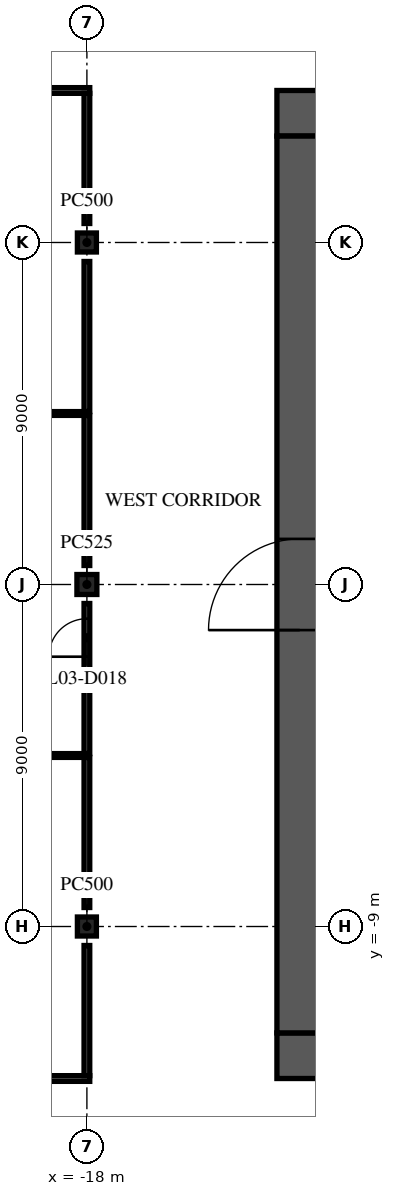
"""IFC4 building model, lengths in metres.
Left out: names, types, materials, properties, quantities, classifications, styles, units other than length and angle.
Written with IfcOpenShell. Run it as: python <this file> out.ifc"""

import sys

from ifc_helpers import new_model, si_unit, direction, frame, frame_2d, origin, origin_2d, place, context, subcontext, project, spatial, rectangle, extrude, element, fill, save


model = new_model("IFC4")
c1 = context("Model", 3, precision=1e-05, world=origin(), true_north=direction((0.0, 1.0)))
c2 = subcontext(c1, "Body", "Model", "MODEL_VIEW")
j1 = project(units=[si_unit("LENGTHUNIT", "METRE"), si_unit("PLANEANGLEUNIT", "RADIAN")], contexts=[c1])
p1 = place(None, origin())
s1 = spatial("IfcSite", under=j1, at=p1, CompositionType="ELEMENT")
p2 = place(p1, origin())
s2 = spatial("IfcBuilding", under=s1, at=p2, CompositionType="ELEMENT")
p3 = place(p2, frame((0.0, 0.0, 13.5)))
s3 = spatial("IfcBuildingStorey", under=s2, at=p3, CompositionType="ELEMENT", Elevation=13.5)
p4 = place(p3, frame((-18.0, -9.0, 0.0), z_axis=(0.0, 0.0, 1.0), x_axis=(1.0, 0.0, 0.0)))
e1 = element("IfcColumn", 1, at=p4, inside=s3, PredefinedType="COLUMN", context=c2, shape_type="SweptSolid", body=[
    extrude(rectangle(XDim=0.5, YDim=0.5, at=origin_2d()), origin(), (0.0, 0.0, 1.0), 4.5),
])
p5 = place(p3, frame((-18.0, 0.0, 0.0), z_axis=(0.0, 0.0, 1.0), x_axis=(1.0, 0.0, 0.0)))
e2 = element("IfcColumn", 2, at=p5, inside=s3, PredefinedType="COLUMN", context=c2, shape_type="SweptSolid", body=[
    extrude(rectangle(XDim=0.525, YDim=0.525, at=origin_2d()), origin(), (0.0, 0.0, 1.0), 4.5),
])
p6 = place(p3, frame((-18.0, 9.0, 0.0), z_axis=(0.0, 0.0, 1.0), x_axis=(1.0, 0.0, 0.0)))
e3 = element("IfcColumn", 3, at=p6, inside=s3, PredefinedType="COLUMN", context=c2, shape_type="SweptSolid", body=[
    extrude(rectangle(XDim=0.5, YDim=0.5, at=origin_2d()), origin(), (0.0, 0.0, 1.0), 4.5),
])
p7 = place(p3, frame((-13.0, 12.4, 0.0), z_axis=(0.0, 0.0, 1.0), x_axis=(1.0, 0.0, 0.0)))
e4 = element("IfcWall", 4, at=p7, inside=s3, PredefinedType="SHEAR", context=c2, shape_type="SweptSolid", body=[
    extrude(rectangle(XDim=26.0, YDim=1.2, at=frame_2d((13.0, 0.0))), origin(), (0.0, 0.0, 1.0), 4.1),
])
p8 = place(p7, frame((11.8, 0.0, 0.0)))
e5 = element("IfcOpeningElement", 5, at=p8, cuts=e4, PredefinedType="OPENING", context=c2, shape_type="SweptSolid", body=[
    extrude(rectangle(XDim=2.4, YDim=2.4, at=frame_2d((1.2, 1.2))), frame((0.0, 0.61, 0.0), z_axis=(0.0, -1.0, 0.0), x_axis=(1.0, 0.0, 0.0)), (0.0, 0.0, 1.0), 1.22),
])
p9 = place(p7, frame((22.625, 0.0, 0.0)))
e6 = element("IfcOpeningElement", 6, at=p9, cuts=e4, PredefinedType="OPENING", context=c2, shape_type="SweptSolid", body=[
    extrude(rectangle(XDim=1.2, YDim=2.1, at=frame_2d((0.6, 1.05))), frame((0.0, 0.61, 0.0), z_axis=(0.0, -1.0, 0.0), x_axis=(1.0, 0.0, 0.0)), (0.0, 0.0, 1.0), 1.22),
])
p10 = place(p7, frame((1.6, 0.0, 0.0)))
e7 = element("IfcOpeningElement", 7, at=p10, cuts=e4, PredefinedType="OPENING", context=c2, shape_type="SweptSolid", body=[
    extrude(rectangle(XDim=1.0, YDim=2.1, at=frame_2d((0.5, 1.05))), frame((0.0, 0.61, 0.0), z_axis=(0.0, -1.0, 0.0), x_axis=(1.0, 0.0, 0.0)), (0.0, 0.0, 1.0), 1.22),
])
p11 = place(p3, frame((-13.0, -12.4, 0.0), z_axis=(0.0, 0.0, 1.0), x_axis=(1.0, 0.0, 0.0)))
e8 = element("IfcWall", 8, at=p11, inside=s3, PredefinedType="SHEAR", context=c2, shape_type="SweptSolid", body=[
    extrude(rectangle(XDim=26.0, YDim=1.2, at=frame_2d((13.0, 0.0))), origin(), (0.0, 0.0, 1.0), 4.1),
])
p12 = place(p11, frame((7.9, 0.0, 0.0)))
e9 = element("IfcOpeningElement", 9, at=p12, cuts=e8, PredefinedType="OPENING", context=c2, shape_type="SweptSolid", body=[
    extrude(rectangle(XDim=2.0, YDim=2.1, at=frame_2d((1.0, 1.05))), frame((0.0, 0.61, 0.0), z_axis=(0.0, -1.0, 0.0), x_axis=(1.0, 0.0, 0.0)), (0.0, 0.0, 1.0), 1.22),
])
p13 = place(p11, frame((18.025, 0.0, 0.0)))
e10 = element("IfcOpeningElement", 10, at=p13, cuts=e8, PredefinedType="OPENING", context=c2, shape_type="SweptSolid", body=[
    extrude(rectangle(XDim=1.2, YDim=2.1, at=frame_2d((0.6, 1.05))), frame((0.0, 0.61, 0.0), z_axis=(0.0, -1.0, 0.0), x_axis=(1.0, 0.0, 0.0)), (0.0, 0.0, 1.0), 1.22),
])
p14 = place(p11, frame((2.175, 0.0, 0.0)))
e11 = element("IfcOpeningElement", 11, at=p14, cuts=e8, PredefinedType="OPENING", context=c2, shape_type="SweptSolid", body=[
    extrude(rectangle(XDim=1.2, YDim=2.1, at=frame_2d((0.6, 1.05))), frame((0.0, 0.61, 0.0), z_axis=(0.0, -1.0, 0.0), x_axis=(1.0, 0.0, 0.0)), (0.0, 0.0, 1.0), 1.22),
])
p15 = place(p11, frame((22.625, 0.0, 0.0)))
e12 = element("IfcOpeningElement", 12, at=p15, cuts=e8, PredefinedType="OPENING", context=c2, shape_type="SweptSolid", body=[
    extrude(rectangle(XDim=1.2, YDim=2.1, at=frame_2d((0.6, 1.05))), frame((0.0, 0.61, 0.0), z_axis=(0.0, -1.0, 0.0), x_axis=(1.0, 0.0, 0.0)), (0.0, 0.0, 1.0), 1.22),
])
p16 = place(p3, frame((-12.4, -11.8, 0.0), z_axis=(0.0, 0.0, 1.0), x_axis=(0.0, 1.0, 0.0)))
e13 = element("IfcWall", 13, at=p16, inside=s3, PredefinedType="SHEAR", context=c2, shape_type="SweptSolid", body=[
    extrude(rectangle(XDim=23.6, YDim=1.2, at=frame_2d((11.8, 0.0))), origin(), (0.0, 0.0, 1.0), 4.1),
])
p17 = place(p16, frame((10.6, 0.0, 0.0)))
e14 = element("IfcOpeningElement", 14, at=p17, cuts=e13, PredefinedType="OPENING", context=c2, shape_type="SweptSolid", body=[
    extrude(rectangle(XDim=2.4, YDim=2.4, at=frame_2d((1.2, 1.2))), frame((0.0, 0.61, 0.0), z_axis=(0.0, -1.0, 0.0), x_axis=(1.0, 0.0, 0.0)), (0.0, 0.0, 1.0), 1.22),
])
p18 = place(p3, frame((-36.0, -13.0, 0.0), z_axis=(0.0, 0.0, 1.0), x_axis=(1.0, 0.0, 0.0)))
e15 = element("IfcWall", 15, at=p18, inside=s3, PredefinedType="PARTITIONING", context=c2, shape_type="SweptSolid", body=[
    extrude(rectangle(XDim=18.075, YDim=0.15, at=frame_2d((9.038, 0.0))), origin(), (0.0, 0.0, 1.0), 4.1),
])
p19 = place(p18, frame((8.5, 0.0, 0.0)))
e16 = element("IfcOpeningElement", 16, at=p19, cuts=e15, PredefinedType="OPENING", context=c2, shape_type="SweptSolid", body=[
    extrude(rectangle(XDim=1.0, YDim=2.1, at=frame_2d((0.5, 1.05))), frame((0.0, 0.085, 0.0), z_axis=(0.0, -1.0, 0.0), x_axis=(1.0, 0.0, 0.0)), (0.0, 0.0, 1.0), 0.17),
])
for number, where, z_axis, x_axis in (
    (17, (-36.0, -4.5, 0.0), (0.0, 0.0, 1.0), (1.0, 0.0, 0.0)),
    (18, (-36.0, 4.5, 0.0), (0.0, 0.0, 1.0), (1.0, 0.0, 0.0)),
):
    element("IfcWall", number, at=place(p3, frame(where, z_axis=z_axis, x_axis=x_axis)), inside=s3, PredefinedType="PARTITIONING", context=c2, shape_type="SweptSolid", body=[
        extrude(rectangle(XDim=17.925, YDim=0.1, at=frame_2d((8.962, 0.0))), origin(), (0.0, 0.0, 1.0), 4.1),
    ])
p20 = place(p3, frame((-36.0, 13.0, 0.0), z_axis=(0.0, 0.0, 1.0), x_axis=(1.0, 0.0, 0.0)))
e19 = element("IfcWall", 19, at=p20, inside=s3, PredefinedType="PARTITIONING", context=c2, shape_type="SweptSolid", body=[
    extrude(rectangle(XDim=18.075, YDim=0.15, at=frame_2d((9.038, 0.0))), origin(), (0.0, 0.0, 1.0), 4.1),
])
p21 = place(p20, frame((8.5, 0.0, 0.0)))
e20 = element("IfcOpeningElement", 20, at=p21, cuts=e19, PredefinedType="OPENING", context=c2, shape_type="SweptSolid", body=[
    extrude(rectangle(XDim=1.0, YDim=2.1, at=frame_2d((0.5, 1.05))), frame((0.0, 0.085, 0.0), z_axis=(0.0, -1.0, 0.0), x_axis=(1.0, 0.0, 0.0)), (0.0, 0.0, 1.0), 0.17),
])
p22 = place(p3, frame((-18.0, -12.925, 0.0), z_axis=(0.0, 0.0, 1.0), x_axis=(0.0, 1.0, 0.0)))
e21 = element("IfcWall", 21, at=p22, inside=s3, PredefinedType="PARTITIONING", context=c2, shape_type="SweptSolid", body=[
    extrude(rectangle(XDim=3.425, YDim=0.15, at=frame_2d((1.712, 0.0))), origin(), (0.0, 0.0, 1.0), 4.1),
])
p23 = place(p3, frame((-18.0, -8.5, 0.0), z_axis=(0.0, 0.0, 1.0), x_axis=(0.0, 1.0, 0.0)))
e22 = element("IfcWall", 22, at=p23, inside=s3, PredefinedType="PARTITIONING", context=c2, shape_type="SweptSolid", body=[
    extrude(rectangle(XDim=3.95, YDim=0.15, at=frame_2d((1.975, 0.0))), origin(), (0.0, 0.0, 1.0), 4.1),
])
p24 = place(p3, frame((-18.0, -4.45, 0.0), z_axis=(0.0, 0.0, 1.0), x_axis=(0.0, 1.0, 0.0)))
e23 = element("IfcWall", 23, at=p24, inside=s3, PredefinedType="PARTITIONING", context=c2, shape_type="SweptSolid", body=[
    extrude(rectangle(XDim=3.95, YDim=0.15, at=frame_2d((1.975, 0.0))), origin(), (0.0, 0.0, 1.0), 4.1),
])
p25 = place(p24, frame((2.55, 0.0, 0.0)))
e24 = element("IfcOpeningElement", 24, at=p25, cuts=e23, PredefinedType="OPENING", context=c2, shape_type="SweptSolid", body=[
    extrude(rectangle(XDim=1.0, YDim=2.1, at=frame_2d((0.5, 1.05))), frame((0.0, 0.085, 0.0), z_axis=(0.0, -1.0, 0.0), x_axis=(1.0, 0.0, 0.0)), (0.0, 0.0, 1.0), 0.17),
])
for number, where, z_axis, x_axis in (
    (25, (-18.0, 0.5, 0.0), (0.0, 0.0, 1.0), (0.0, 1.0, 0.0)),
    (26, (-18.0, 4.55, 0.0), (0.0, 0.0, 1.0), (0.0, 1.0, 0.0)),
):
    element("IfcWall", number, at=place(p3, frame(where, z_axis=z_axis, x_axis=x_axis)), inside=s3, PredefinedType="PARTITIONING", context=c2, shape_type="SweptSolid", body=[
        extrude(rectangle(XDim=3.95, YDim=0.15, at=frame_2d((1.975, 0.0))), origin(), (0.0, 0.0, 1.0), 4.1),
    ])
p26 = place(p3, frame((-18.0, 9.5, 0.0), z_axis=(0.0, 0.0, 1.0), x_axis=(0.0, 1.0, 0.0)))
e27 = element("IfcWall", 27, at=p26, inside=s3, PredefinedType="PARTITIONING", context=c2, shape_type="SweptSolid", body=[
    extrude(rectangle(XDim=3.425, YDim=0.15, at=frame_2d((1.712, 0.0))), origin(), (0.0, 0.0, 1.0), 4.1),
])
p27 = place(p17, origin())
e28 = element("IfcDoor", 28, at=p27, inside=s3, OperationType="SINGLE_SWING_LEFT", PredefinedType="DOOR", context=c2, shape_type="SweptSolid", body=[
    extrude(rectangle(XDim=2.4, YDim=2.4, at=frame_2d((1.2, 1.2))), frame((0.0, 0.025, 0.0), z_axis=(0.0, -1.0, 0.0), x_axis=(1.0, 0.0, 0.0)), (0.0, 0.0, 1.0), 0.05),
])
fill(e14, e28)
p28 = place(p25, origin())
e29 = element("IfcDoor", 29, at=p28, inside=s3, OperationType="SINGLE_SWING_RIGHT", PredefinedType="DOOR", context=c2, shape_type="SweptSolid", body=[
    extrude(rectangle(XDim=1.0, YDim=2.1, at=frame_2d((0.5, 1.05))), frame((0.0, 0.025, 0.0), z_axis=(0.0, -1.0, 0.0), x_axis=(1.0, 0.0, 0.0)), (0.0, 0.0, 1.0), 0.05),
])
fill(e24, e29)
save(model, sys.argv[1])
